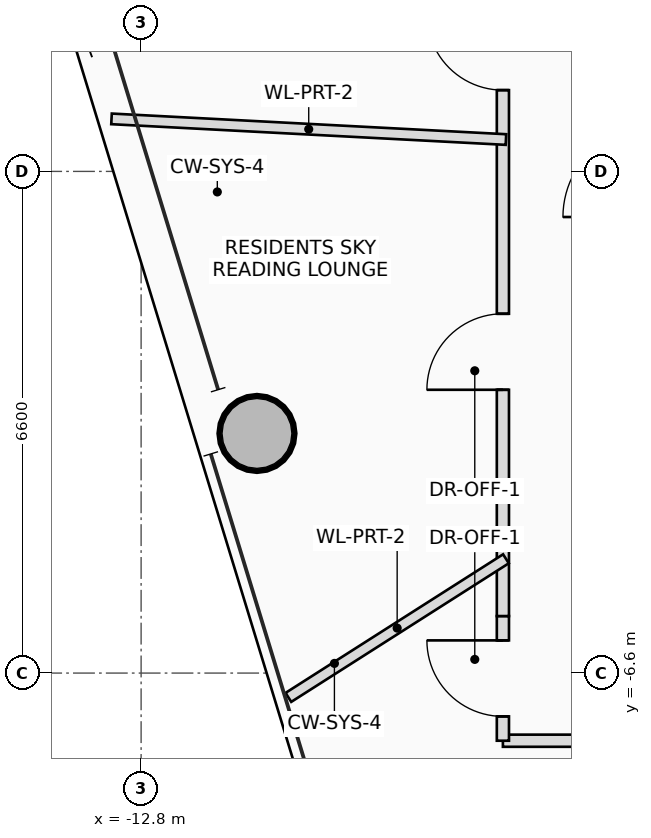
"""IFC4 building model, lengths in metres.
Left out: names, types, materials, properties, quantities, classifications, styles, units other than length and angle.
Written with IfcOpenShell. Run it as: python <this file> out.ifc"""

import sys

from ifc_helpers import new_model, si_unit, direction, frame, frame_2d, origin, origin_2d, place, context, subcontext, project, spatial, rectangle, hollow_circle, extrude, source, transform, mapped, element, fill, save


model = new_model("IFC4")
c1 = context("Model", 3, precision=1e-05, world=origin(), true_north=direction((0.0, 1.0)))
c2 = subcontext(c1, "Body", "Model", "MODEL_VIEW")
j1 = project(units=[si_unit("LENGTHUNIT", "METRE"), si_unit("PLANEANGLEUNIT", "RADIAN")], contexts=[c1])
p1 = place(None, origin())
s1 = spatial("IfcSite", under=j1, at=p1, CompositionType="ELEMENT")
p2 = place(p1, origin())
s2 = spatial("IfcBuilding", under=s1, at=p2, CompositionType="ELEMENT")
p3 = place(p2, frame((0.0, 0.0, 235.45)))
s3 = spatial("IfcBuildingStorey", under=s2, at=p3, CompositionType="ELEMENT", Elevation=235.45)
m1 = source(origin(), c2, "Body", "SweptSolid", [
    extrude(hollow_circle(Radius=0.5, WallThickness=0.04, at=origin_2d()), origin(), (0.0, 0.0, 1.0), 3.4),
])
p4 = place(p3, frame((-11.276, -3.448, 0.0), z_axis=(0.0, 0.0, 1.0), x_axis=(1.0, 0.0, 0.0)))
e1 = element("IfcColumn", 1, at=p4, inside=s3, PredefinedType="COLUMN", context=c2, shape_type="MappedRepresentation", body=[
    mapped(m1, transform((0.0, 0.0, 0.0), scale=1.0)),
])
p5 = place(p3, frame((-6.36, -7.49, 0.0), z_axis=(0.0, 0.0, 1.0), x_axis=(-1.0, 0.0, 0.0)))
e2 = element("IfcWall", 2, at=p5, inside=s3, PredefinedType="PARTITIONING", context=c2, shape_type="SweptSolid", body=[
    extrude(rectangle(XDim=1.68, YDim=0.16, at=frame_2d((0.84, 0.0))), origin(), (0.0, 0.0, 1.0), 2.605),
])
p6 = place(p3, frame((-8.04, -7.49, 0.0), z_axis=(0.0, 0.0, 1.0), x_axis=(0.0, 1.0, 0.0)))
e3 = element("IfcWall", 3, at=p6, inside=s3, PredefinedType="PARTITIONING", context=c2, shape_type="SweptSolid", body=[
    extrude(rectangle(XDim=1.64, YDim=0.16, at=frame_2d((0.82, 0.0))), origin(), (0.0, 0.0, 1.0), 2.805),
])
p7 = place(p6, frame((0.32, 0.0, 0.0)))
e4 = element("IfcOpeningElement", 4, at=p7, cuts=e3, PredefinedType="OPENING", context=c2, shape_type="SweptSolid", body=[
    extrude(rectangle(XDim=1.0, YDim=2.25, at=frame_2d((0.5, 1.125))), frame((0.0, 0.09, 0.0), z_axis=(0.0, -1.0, 0.0), x_axis=(1.0, 0.0, 0.0)), (0.0, 0.0, 1.0), 0.18),
])
p8 = place(p3, frame((-8.04, -5.85, 0.0), z_axis=(0.0, 0.0, 1.0), x_axis=(0.0, 1.0, 0.0)))
e5 = element("IfcWall", 5, at=p8, inside=s3, PredefinedType="PARTITIONING", context=c2, shape_type="SweptSolid", body=[
    extrude(rectangle(XDim=11.7, YDim=0.16, at=frame_2d((5.85, 0.0))), origin(), (0.0, 0.0, 1.0), 2.605),
])
p9 = place(p8, frame((2.977, 0.0, 0.0)))
e6 = element("IfcOpeningElement", 6, at=p9, cuts=e5, PredefinedType="OPENING", context=c2, shape_type="SweptSolid", body=[
    extrude(rectangle(XDim=1.0, YDim=2.25, at=frame_2d((0.5, 1.125))), frame((0.0, 0.09, 0.0), z_axis=(0.0, -1.0, 0.0), x_axis=(1.0, 0.0, 0.0)), (0.0, 0.0, 1.0), 0.18),
])
p10 = place(p8, frame((6.919, 0.0, 0.0)))
e7 = element("IfcOpeningElement", 7, at=p10, cuts=e5, PredefinedType="OPENING", context=c2, shape_type="SweptSolid", body=[
    extrude(rectangle(XDim=1.0, YDim=2.25, at=frame_2d((0.5, 1.125))), frame((0.0, 0.09, 0.0), z_axis=(0.0, -1.0, 0.0), x_axis=(1.0, 0.0, 0.0)), (0.0, 0.0, 1.0), 0.18),
])
p11 = place(p3, frame((-8.0, 0.419, 0.0), z_axis=(0.0, 0.0, 1.0), x_axis=(-0.998629485047, 0.052336904702, 0.0)))
e8 = element("IfcWall", 8, at=p11, inside=s3, PredefinedType="PARTITIONING", context=c2, shape_type="SweptSolid", body=[
    extrude(rectangle(XDim=5.197, YDim=0.14, at=frame_2d((2.598, 0.0))), origin(), (0.0, 0.0, 1.0), 2.765),
])
p12 = place(p3, frame((-8.0, -5.097, 0.0), z_axis=(0.0, 0.0, 1.0), x_axis=(-0.843391828446, -0.537299007733, 0.0)))
e9 = element("IfcWall", 9, at=p12, inside=s3, PredefinedType="PARTITIONING", context=c2, shape_type="SweptSolid", body=[
    extrude(rectangle(XDim=3.394, YDim=0.14, at=frame_2d((1.697, 0.0))), origin(), (0.0, 0.0, 1.0), 2.765),
])
p13 = place(p3, frame((-6.033, -7.45, 0.0), z_axis=(0.0, 0.0, 1.0), x_axis=(-0.629318234002, -0.777147708195, 0.0)))
e10 = element("IfcWall", 10, at=p13, inside=s3, PredefinedType="PARTITIONING", context=c2, shape_type="SweptSolid", body=[
    extrude(rectangle(XDim=5.384, YDim=0.14, at=frame_2d((2.692, 0.0))), origin(), (0.0, 0.0, 1.0), 2.605),
])
p14 = place(p7, origin())
e11 = element("IfcDoor", 11, at=p14, inside=s3, OperationType="SINGLE_SWING_RIGHT", PredefinedType="DOOR", context=c2, shape_type="SweptSolid", body=[
    extrude(rectangle(XDim=1.0, YDim=2.25, at=frame_2d((0.5, 1.125))), frame((0.0, 0.025, 0.0), z_axis=(0.0, -1.0, 0.0), x_axis=(1.0, 0.0, 0.0)), (0.0, 0.0, 1.0), 0.05),
])
fill(e4, e11)
p15 = place(p9, origin())
e12 = element("IfcDoor", 12, at=p15, inside=s3, OperationType="SINGLE_SWING_LEFT", PredefinedType="DOOR", context=c2, shape_type="SweptSolid", body=[
    extrude(rectangle(XDim=1.0, YDim=2.25, at=frame_2d((0.5, 1.125))), frame((0.0, 0.025, 0.0), z_axis=(0.0, -1.0, 0.0), x_axis=(1.0, 0.0, 0.0)), (0.0, 0.0, 1.0), 0.05),
])
fill(e6, e12)
p16 = place(p10, origin())
e13 = element("IfcDoor", 13, at=p16, inside=s3, OperationType="SINGLE_SWING_RIGHT", PredefinedType="DOOR", context=c2, shape_type="SweptSolid", body=[
    extrude(rectangle(XDim=1.0, YDim=2.25, at=frame_2d((0.5, 1.125))), frame((0.0, 0.025, 0.0), z_axis=(0.0, -1.0, 0.0), x_axis=(1.0, 0.0, 0.0)), (0.0, 0.0, 1.0), 0.05),
])
fill(e7, e13)
save(model, sys.argv[1])
